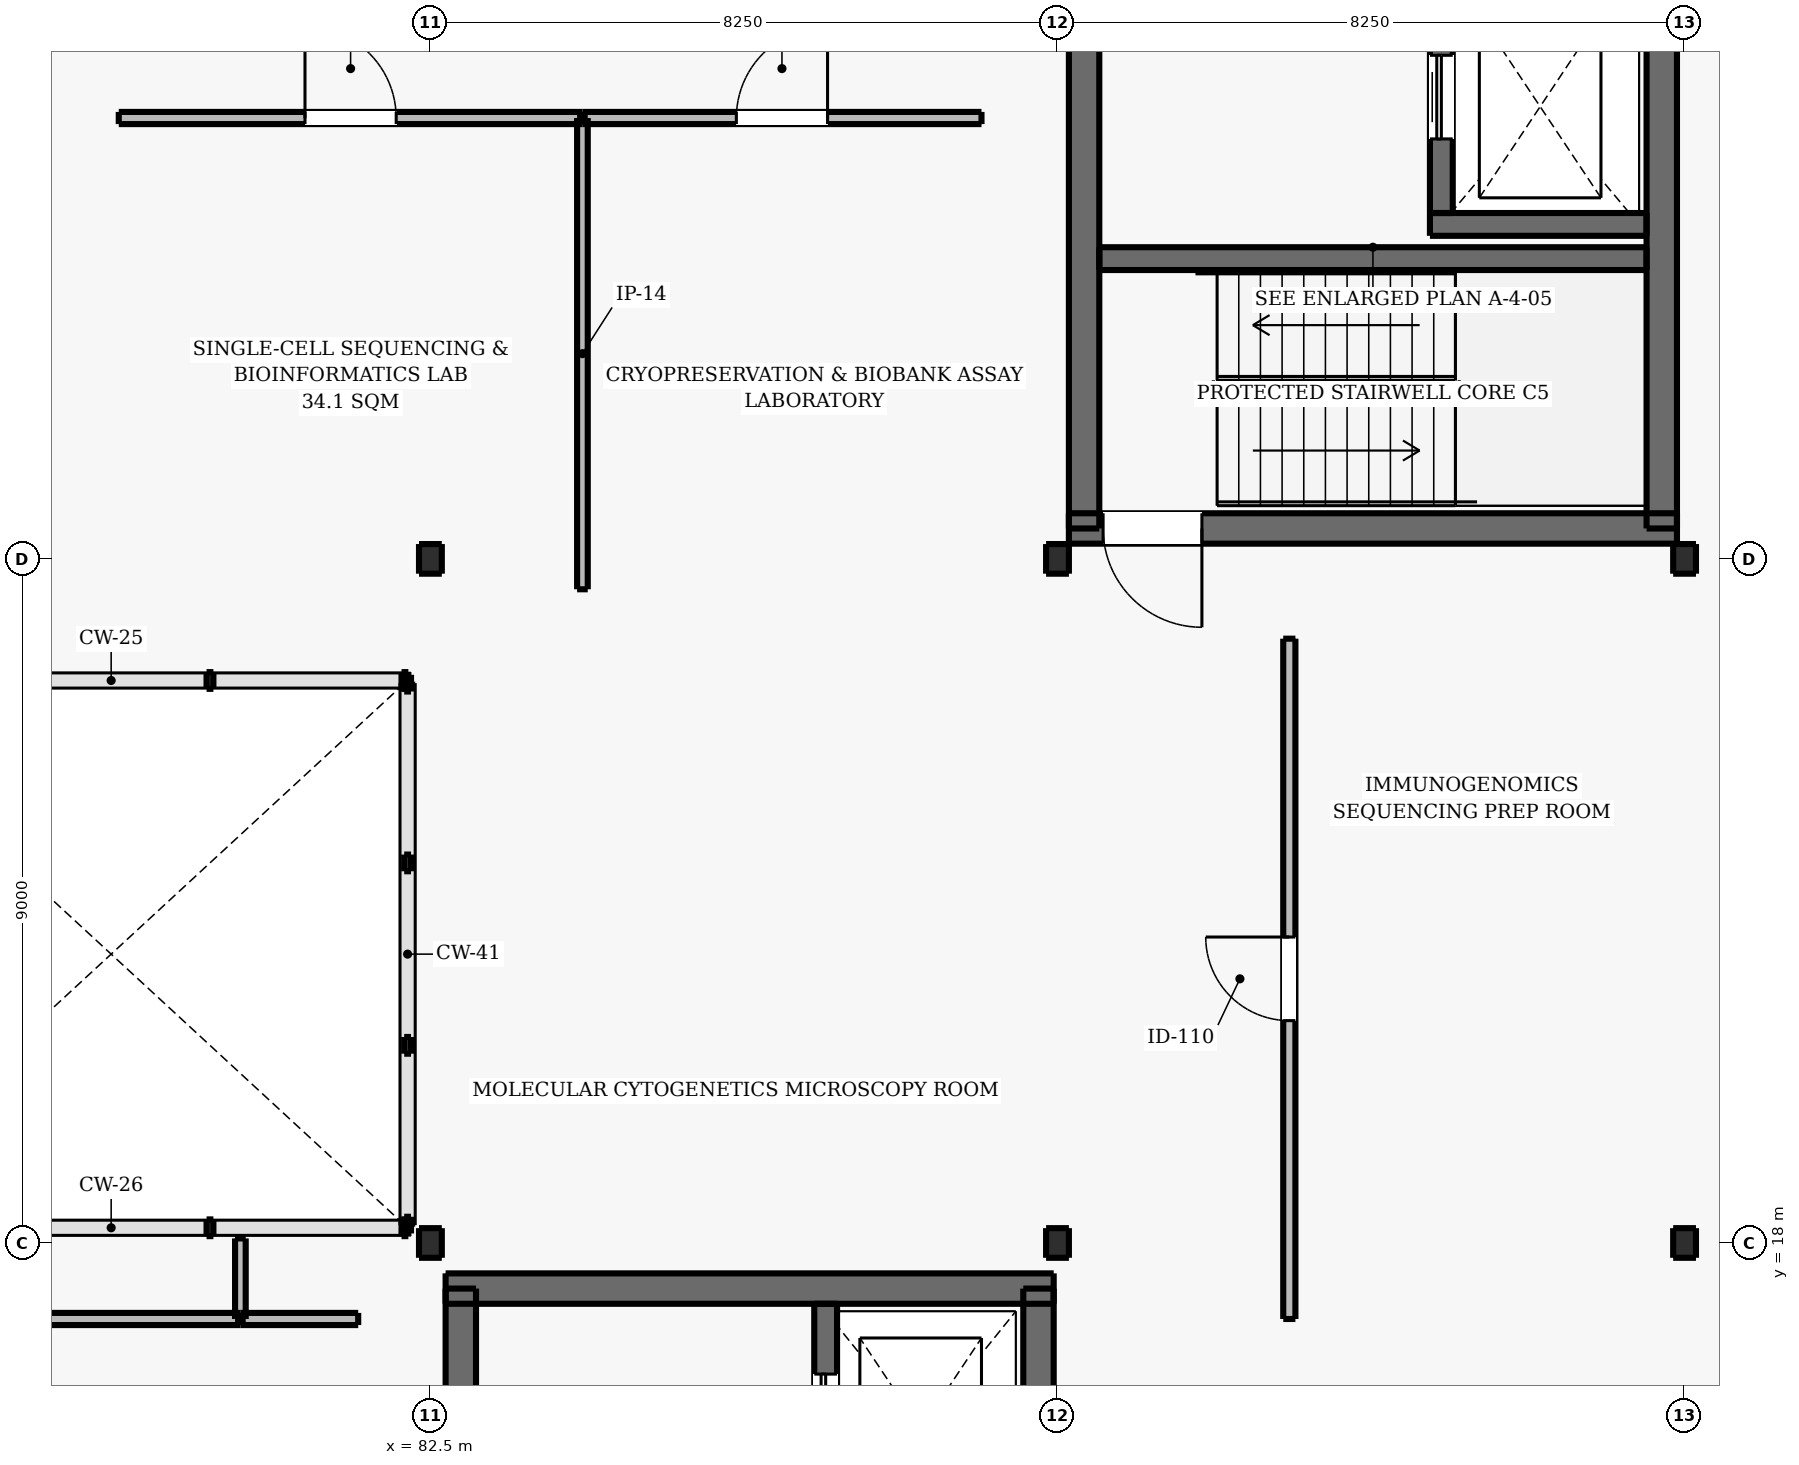
"""IFC4 building model, lengths in metres.
Left out: names, types, materials, properties, quantities, classifications, styles, units other than length and angle.
Written with IfcOpenShell. Run it as: python <this file> out.ifc"""

import sys

from ifc_helpers import new_model, si_unit, direction, frame, frame_2d, origin, origin_2d, place, context, subcontext, project, spatial, rectangle, i_section, extrude, element, fill, save


model = new_model("IFC4")
c1 = context("Model", 3, precision=1e-05, world=origin(), true_north=direction((0.0, 1.0)))
c2 = subcontext(c1, "Body", "Model", "MODEL_VIEW")
j1 = project(units=[si_unit("LENGTHUNIT", "METRE"), si_unit("PLANEANGLEUNIT", "RADIAN")], contexts=[c1])
p1 = place(None, origin())
s1 = spatial("IfcSite", under=j1, at=p1, CompositionType="ELEMENT")
p2 = place(p1, origin())
s2 = spatial("IfcBuilding", under=s1, at=p2, CompositionType="ELEMENT")
p3 = place(p2, frame((0.0, 0.0, 22.2)))
s3 = spatial("IfcBuildingStorey", under=s2, at=p3, CompositionType="ELEMENT", Elevation=22.2)
for number, where, z_axis, x_axis in (
    (1, (82.5, 18.0, 0.0), (0.0, 0.0, 1.0), (1.0, 0.0, 0.0)),
    (2, (82.5, 27.0, 0.0), (0.0, 0.0, 1.0), (1.0, 0.0, 0.0)),
    (3, (90.75, 18.0, 0.0), (0.0, 0.0, 1.0), (1.0, 0.0, 0.0)),
    (4, (90.75, 27.0, 0.0), (0.0, 0.0, 1.0), (1.0, 0.0, 0.0)),
    (5, (99.0, 18.0, 0.0), (0.0, 0.0, 1.0), (1.0, 0.0, 0.0)),
    (6, (99.0, 27.0, 0.0), (0.0, 0.0, 1.0), (1.0, 0.0, 0.0)),
):
    element("IfcColumn", number, at=place(p3, frame(where, z_axis=z_axis, x_axis=x_axis)), inside=s3, PredefinedType="COLUMN", context=c2, shape_type="SweptSolid", body=[
        extrude(i_section(OverallWidth=0.3, OverallDepth=0.39, WebThickness=0.011, FlangeThickness=0.019, FilletRadius=0.027, at=origin_2d()), origin(), (0.0, 0.0, 1.0), 4.2),
    ])
p4 = place(p3, frame((82.7, 17.4, 0.0), z_axis=(0.0, 0.0, 1.0), x_axis=(1.0, 0.0, 0.0)))
e7 = element("IfcWall", 7, at=p4, inside=s3, PredefinedType="SHEAR", context=c2, shape_type="SweptSolid", body=[
    extrude(rectangle(XDim=8.0, YDim=0.4, at=frame_2d((4.0, 0.0))), origin(), (0.0, 0.0, 1.0), 4.2),
])
p5 = place(p3, frame((82.9, 9.8, 0.0), z_axis=(0.0, 0.0, 1.0), x_axis=(0.0, 1.0, 0.0)))
e8 = element("IfcWall", 8, at=p5, inside=s3, PredefinedType="SHEAR", context=c2, shape_type="SweptSolid", body=[
    extrude(rectangle(XDim=7.6, YDim=0.4, at=frame_2d((3.8, 0.0))), origin(), (0.0, 0.0, 1.0), 4.2),
])
p6 = place(p5, frame((5.09, 0.0, 0.0)))
e9 = element("IfcOpeningElement", 9, at=p6, cuts=e8, PredefinedType="OPENING", context=c2, shape_type="SweptSolid", body=[
    extrude(rectangle(XDim=1.12, YDim=2.15, at=frame_2d((0.56, 1.075))), frame((0.0, 0.21, 0.0), z_axis=(0.0, -1.0, 0.0), x_axis=(1.0, 0.0, 0.0)), (0.0, 0.0, 1.0), 0.42),
])
p7 = place(p3, frame((90.5, 9.8, 0.0), z_axis=(0.0, 0.0, 1.0), x_axis=(0.0, 1.0, 0.0)))
e10 = element("IfcWall", 10, at=p7, inside=s3, PredefinedType="SHEAR", context=c2, shape_type="SweptSolid", body=[
    extrude(rectangle(XDim=7.6, YDim=0.4, at=frame_2d((3.8, 0.0))), origin(), (0.0, 0.0, 1.0), 4.2),
])
p8 = place(p3, frame((87.7, 14.15, 0.0), z_axis=(0.0, 0.0, 1.0), x_axis=(0.0, 1.0, 0.0)))
e11 = element("IfcWall", 11, at=p8, inside=s3, PredefinedType="SHEAR", context=c2, shape_type="SweptSolid", body=[
    extrude(rectangle(XDim=3.05, YDim=0.3, at=frame_2d((1.525, 0.0))), origin(), (0.0, 0.0, 1.0), 4.2),
])
p9 = place(p8, frame((0.925, 0.0, 0.0)))
e12 = element("IfcOpeningElement", 12, at=p9, cuts=e11, PredefinedType="OPENING", context=c2, shape_type="SweptSolid", body=[
    extrude(rectangle(XDim=1.2, YDim=2.15, at=frame_2d((0.6, 1.075))), frame((0.0, 0.16, 0.0), z_axis=(0.0, -1.0, 0.0), x_axis=(1.0, 0.0, 0.0)), (0.0, 0.0, 1.0), 0.32),
])
p10 = place(p3, frame((90.9, 27.4, 0.0), z_axis=(0.0, 0.0, 1.0), x_axis=(1.0, 0.0, 0.0)))
e13 = element("IfcWall", 13, at=p10, inside=s3, PredefinedType="SHEAR", context=c2, shape_type="SweptSolid", body=[
    extrude(rectangle(XDim=8.0, YDim=0.4, at=frame_2d((4.0, 0.0))), origin(), (0.0, 0.0, 1.0), 4.2),
])
p11 = place(p10, frame((0.45, 0.0, 0.0)))
e14 = element("IfcOpeningElement", 14, at=p11, cuts=e13, PredefinedType="OPENING", context=c2, shape_type="SweptSolid", body=[
    extrude(rectangle(XDim=1.3, YDim=2.15, at=frame_2d((0.65, 1.075))), frame((0.0, 0.21, 0.0), z_axis=(0.0, -1.0, 0.0), x_axis=(1.0, 0.0, 0.0)), (0.0, 0.0, 1.0), 0.42),
])
for number, where, z_axis, x_axis in (
    (15, (91.1, 27.4, 0.0), (0.0, 0.0, 1.0), (0.0, 1.0, 0.0)),
    (16, (98.7, 27.4, 0.0), (0.0, 0.0, 1.0), (0.0, 1.0, 0.0)),
):
    element("IfcWall", number, at=place(p3, frame(where, z_axis=z_axis, x_axis=x_axis)), inside=s3, PredefinedType="SHEAR", context=c2, shape_type="SweptSolid", body=[
        extrude(rectangle(XDim=7.4, YDim=0.4, at=frame_2d((3.7, 0.0))), origin(), (0.0, 0.0, 1.0), 4.2),
    ])
p12 = place(p3, frame((91.3, 30.95, 0.0), z_axis=(0.0, 0.0, 1.0), x_axis=(1.0, 0.0, 0.0)))
e17 = element("IfcWall", 17, at=p12, inside=s3, PredefinedType="SHEAR", context=c2, shape_type="SweptSolid", body=[
    extrude(rectangle(XDim=7.2, YDim=0.3, at=frame_2d((3.6, 0.0))), origin(), (0.0, 0.0, 1.0), 4.2),
])
p13 = place(p3, frame((95.65, 31.4, 0.0), z_axis=(0.0, 0.0, 1.0), x_axis=(1.0, 0.0, 0.0)))
e18 = element("IfcWall", 18, at=p13, inside=s3, PredefinedType="SHEAR", context=c2, shape_type="SweptSolid", body=[
    extrude(rectangle(XDim=2.85, YDim=0.3, at=frame_2d((1.425, 0.0))), origin(), (0.0, 0.0, 1.0), 4.2),
])
p14 = place(p3, frame((95.8, 31.55, 0.0), z_axis=(0.0, 0.0, 1.0), x_axis=(0.0, 1.0, 0.0)))
e19 = element("IfcWall", 19, at=p14, inside=s3, PredefinedType="SHEAR", context=c2, shape_type="SweptSolid", body=[
    extrude(rectangle(XDim=3.05, YDim=0.3, at=frame_2d((1.525, 0.0))), origin(), (0.0, 0.0, 1.0), 4.2),
])
p15 = place(p14, frame((0.975, 0.0, 0.0)))
e20 = element("IfcOpeningElement", 20, at=p15, cuts=e19, PredefinedType="OPENING", context=c2, shape_type="SweptSolid", body=[
    extrude(rectangle(XDim=1.1, YDim=2.15, at=frame_2d((0.55, 1.075))), frame((0.0, 0.16, 0.0), z_axis=(0.0, -1.0, 0.0), x_axis=(1.0, 0.0, 0.0)), (0.0, 0.0, 1.0), 0.32),
])
p16 = place(p3, frame((78.4, 32.8, 0.0), z_axis=(0.0, 0.0, 1.0), x_axis=(1.0, 0.0, 0.0)))
e21 = element("IfcWall", 21, at=p16, inside=s3, PredefinedType="PARTITIONING", context=c2, shape_type="SweptSolid", body=[
    extrude(rectangle(XDim=6.1, YDim=0.16, at=frame_2d((3.05, 0.0))), origin(), (0.0, 0.0, 1.0), 3.94),
])
p17 = place(p16, frame((2.45, 0.0, 0.0)))
e22 = element("IfcOpeningElement", 22, at=p17, cuts=e21, PredefinedType="OPENING", context=c2, shape_type="SweptSolid", body=[
    extrude(rectangle(XDim=1.2, YDim=2.2, at=frame_2d((0.6, 1.1))), frame((0.0, 0.09, 0.0), z_axis=(0.0, -1.0, 0.0), x_axis=(1.0, 0.0, 0.0)), (0.0, 0.0, 1.0), 0.18),
])
p18 = place(p3, frame((84.5, 26.6, 0.0), z_axis=(0.0, 0.0, 1.0), x_axis=(0.0, 1.0, 0.0)))
e23 = element("IfcWall", 23, at=p18, inside=s3, PredefinedType="PARTITIONING", context=c2, shape_type="SweptSolid", body=[
    extrude(rectangle(XDim=6.2, YDim=0.14, at=frame_2d((3.1, 0.0))), origin(), (0.0, 0.0, 1.0), 3.94),
])
p19 = place(p3, frame((84.5, 32.8, 0.0), z_axis=(0.0, 0.0, 1.0), x_axis=(1.0, 0.0, 0.0)))
e24 = element("IfcWall", 24, at=p19, inside=s3, PredefinedType="PARTITIONING", context=c2, shape_type="SweptSolid", body=[
    extrude(rectangle(XDim=5.25, YDim=0.16, at=frame_2d((2.625, 0.0))), origin(), (0.0, 0.0, 1.0), 3.94),
])
p20 = place(p19, frame((2.025, 0.0, 0.0)))
e25 = element("IfcOpeningElement", 25, at=p20, cuts=e24, PredefinedType="OPENING", context=c2, shape_type="SweptSolid", body=[
    extrude(rectangle(XDim=1.2, YDim=2.2, at=frame_2d((0.6, 1.1))), frame((0.0, 0.09, 0.0), z_axis=(0.0, -1.0, 0.0), x_axis=(1.0, 0.0, 0.0)), (0.0, 0.0, 1.0), 0.18),
])
p21 = place(p3, frame((69.4, 17.0, 0.0), z_axis=(0.0, 0.0, 1.0), x_axis=(1.0, 0.0, 0.0)))
e26 = element("IfcWall", 26, at=p21, inside=s3, PredefinedType="PARTITIONING", context=c2, shape_type="SweptSolid", body=[
    extrude(rectangle(XDim=10.6, YDim=0.16, at=frame_2d((5.3, 0.0))), origin(), (0.0, 0.0, 1.0), 3.94),
])
p22 = place(p21, frame((6.076, 0.0, 0.0)))
e27 = element("IfcOpeningElement", 27, at=p22, cuts=e26, PredefinedType="OPENING", context=c2, shape_type="SweptSolid", body=[
    extrude(rectangle(XDim=1.2, YDim=2.2, at=frame_2d((0.6, 1.1))), frame((0.0, 0.09, 0.0), z_axis=(0.0, -1.0, 0.0), x_axis=(1.0, 0.0, 0.0)), (0.0, 0.0, 1.0), 0.18),
])
p23 = place(p3, frame((80.0, 17.0, 0.0), z_axis=(0.0, 0.0, 1.0), x_axis=(0.0, 1.0, 0.0)))
e28 = element("IfcWall", 28, at=p23, inside=s3, PredefinedType="PARTITIONING", context=c2, shape_type="SweptSolid", body=[
    extrude(rectangle(XDim=1.06, YDim=0.14, at=frame_2d((0.53, 0.0))), origin(), (0.0, 0.0, 1.0), 3.94),
])
p24 = place(p3, frame((80.0, 17.0, 0.0), z_axis=(0.0, 0.0, 1.0), x_axis=(1.0, 0.0, 0.0)))
e29 = element("IfcWall", 29, at=p24, inside=s3, PredefinedType="PARTITIONING", context=c2, shape_type="SweptSolid", body=[
    extrude(rectangle(XDim=1.55, YDim=0.16, at=frame_2d((0.775, 0.0))), origin(), (0.0, 0.0, 1.0), 3.94),
])
p25 = place(p3, frame((93.8, 17.0, 0.0), z_axis=(0.0, 0.0, 1.0), x_axis=(0.0, 1.0, 0.0)))
e30 = element("IfcWall", 30, at=p25, inside=s3, PredefinedType="PARTITIONING", context=c2, shape_type="SweptSolid", body=[
    extrude(rectangle(XDim=8.95, YDim=0.16, at=frame_2d((4.475, 0.0))), origin(), (0.0, 0.0, 1.0), 3.94),
])
p26 = place(p25, frame((3.925, 0.0, 0.0)))
e31 = element("IfcOpeningElement", 31, at=p26, cuts=e30, PredefinedType="OPENING", context=c2, shape_type="SweptSolid", body=[
    extrude(rectangle(XDim=1.1, YDim=2.15, at=frame_2d((0.55, 1.075))), frame((0.0, 0.09, 0.0), z_axis=(0.0, -1.0, 0.0), x_axis=(1.0, 0.0, 0.0)), (0.0, 0.0, 1.0), 0.18),
])
p27 = place(p9, origin())
e32 = element("IfcDoor", 32, at=p27, inside=s3, OperationType="DOUBLE_DOOR_SLIDING", PredefinedType="DOOR", context=c2, shape_type="SweptSolid", body=[
    extrude(rectangle(XDim=1.2, YDim=2.15, at=frame_2d((0.6, 1.075))), frame((0.0, 0.025, 0.0), z_axis=(0.0, -1.0, 0.0), x_axis=(1.0, 0.0, 0.0)), (0.0, 0.0, 1.0), 0.05),
])
fill(e12, e32)
p28 = place(p15, origin())
e33 = element("IfcDoor", 33, at=p28, inside=s3, OperationType="DOUBLE_DOOR_SLIDING", PredefinedType="DOOR", context=c2, shape_type="SweptSolid", body=[
    extrude(rectangle(XDim=1.1, YDim=2.15, at=frame_2d((0.55, 1.075))), frame((0.0, 0.025, 0.0), z_axis=(0.0, -1.0, 0.0), x_axis=(1.0, 0.0, 0.0)), (0.0, 0.0, 1.0), 0.05),
])
fill(e20, e33)
p29 = place(p11, frame((1.3, 0.0, 0.0), z_axis=(0.0, 0.0, 1.0), x_axis=(-1.0, 0.0, 0.0)))
e34 = element("IfcDoor", 34, at=p29, inside=s3, OperationType="SINGLE_SWING_RIGHT", PredefinedType="DOOR", context=c2, shape_type="SweptSolid", body=[
    extrude(rectangle(XDim=1.3, YDim=2.15, at=frame_2d((0.65, 1.075))), frame((0.0, 0.025, 0.0), z_axis=(0.0, -1.0, 0.0), x_axis=(1.0, 0.0, 0.0)), (0.0, 0.0, 1.0), 0.05),
])
fill(e14, e34)
p30 = place(p17, origin())
e35 = element("IfcDoor", 35, at=p30, inside=s3, OperationType="SINGLE_SWING_LEFT", PredefinedType="DOOR", context=c2, shape_type="SweptSolid", body=[
    extrude(rectangle(XDim=1.2, YDim=2.2, at=frame_2d((0.6, 1.1))), frame((0.0, 0.025, 0.0), z_axis=(0.0, -1.0, 0.0), x_axis=(1.0, 0.0, 0.0)), (0.0, 0.0, 1.0), 0.05),
])
fill(e22, e35)
p31 = place(p20, origin())
e36 = element("IfcDoor", 36, at=p31, inside=s3, OperationType="SINGLE_SWING_RIGHT", PredefinedType="DOOR", context=c2, shape_type="SweptSolid", body=[
    extrude(rectangle(XDim=1.2, YDim=2.2, at=frame_2d((0.6, 1.1))), frame((0.0, 0.025, 0.0), z_axis=(0.0, -1.0, 0.0), x_axis=(1.0, 0.0, 0.0)), (0.0, 0.0, 1.0), 0.05),
])
fill(e25, e36)
p32 = place(p26, origin())
e37 = element("IfcDoor", 37, at=p32, inside=s3, OperationType="SINGLE_SWING_RIGHT", PredefinedType="DOOR", context=c2, shape_type="SweptSolid", body=[
    extrude(rectangle(XDim=1.1, YDim=2.15, at=frame_2d((0.55, 1.075))), frame((0.0, 0.025, 0.0), z_axis=(0.0, -1.0, 0.0), x_axis=(1.0, 0.0, 0.0)), (0.0, 0.0, 1.0), 0.05),
])
fill(e31, e37)
save(model, sys.argv[1])
